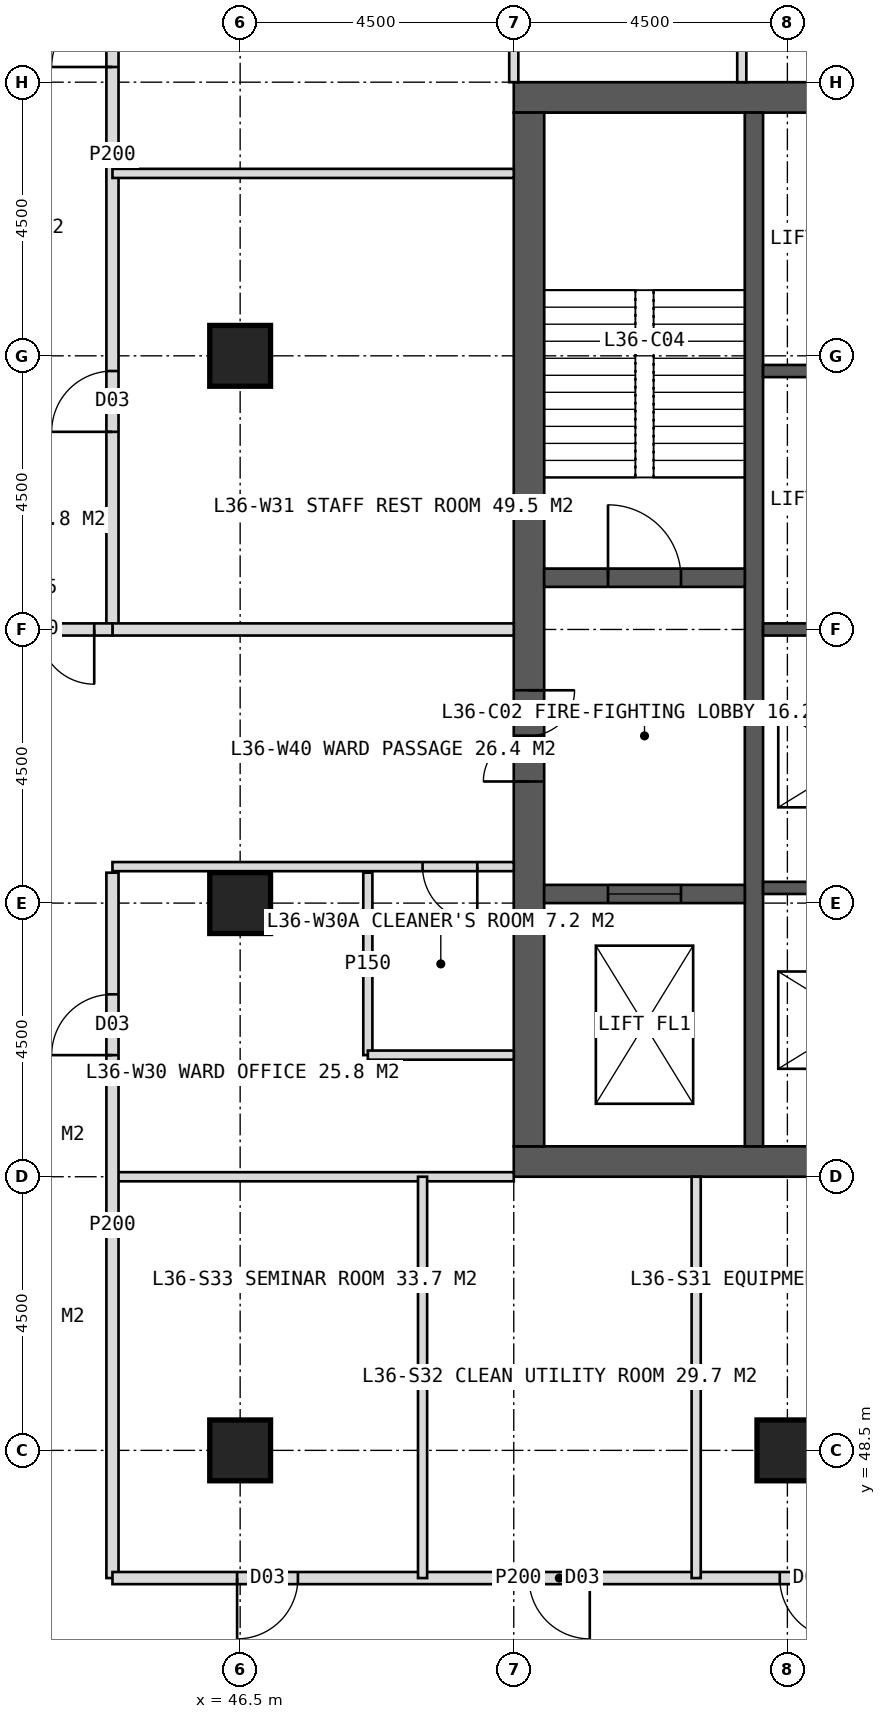
"""IFC4 building model, lengths in metres.
Left out: names, types, materials, properties, quantities, classifications, styles, units other than length and angle.
Written with IfcOpenShell. Run it as: python <this file> out.ifc"""

import sys

from ifc_helpers import new_model, si_unit, direction, frame, frame_2d, origin, origin_2d, place, context, subcontext, project, spatial, rectangle, hollow_rectangle, extrude, element, fill, save


model = new_model("IFC4")
c1 = context("Model", 3, precision=1e-05, world=origin(), true_north=direction((0.0, 1.0)))
c2 = subcontext(c1, "Body", "Model", "MODEL_VIEW")
j1 = project(units=[si_unit("LENGTHUNIT", "METRE"), si_unit("PLANEANGLEUNIT", "RADIAN")], contexts=[c1])
p1 = place(None, origin())
s1 = spatial("IfcSite", under=j1, at=p1, CompositionType="ELEMENT")
p2 = place(p1, origin())
s2 = spatial("IfcBuilding", under=s1, at=p2, CompositionType="ELEMENT")
p3 = place(p2, frame((0.0, 0.0, 152.0)))
s3 = spatial("IfcBuildingStorey", under=s2, at=p3, CompositionType="ELEMENT", Elevation=152.0)
p4 = place(p3, frame((51.0, 70.75, 0.0), z_axis=(0.0, 0.0, 1.0), x_axis=(1.0, 0.0, 0.0)))
e1 = element("IfcWall", 1, at=p4, inside=s3, PredefinedType="SHEAR", context=c2, shape_type="SweptSolid", body=[
    extrude(rectangle(XDim=18.0, YDim=0.5, at=frame_2d((9.0, 0.0))), origin(), (0.0, 0.0, 1.0), 4.0),
])
p5 = place(p4, frame((8.1, 0.0, 0.0)))
e2 = element("IfcOpeningElement", 2, at=p5, cuts=e1, PredefinedType="OPENING", context=c2, shape_type="SweptSolid", body=[
    extrude(rectangle(XDim=1.8, YDim=2.2, at=frame_2d((0.9, 1.1))), frame((0.0, 0.26, 0.0), z_axis=(0.0, -1.0, 0.0), x_axis=(1.0, 0.0, 0.0)), (0.0, 0.0, 1.0), 0.52),
])
p6 = place(p3, frame((51.0, 53.25, 0.0), z_axis=(0.0, 0.0, 1.0), x_axis=(1.0, 0.0, 0.0)))
e3 = element("IfcWall", 3, at=p6, inside=s3, PredefinedType="SHEAR", context=c2, shape_type="SweptSolid", body=[
    extrude(rectangle(XDim=18.0, YDim=0.5, at=frame_2d((9.0, 0.0))), origin(), (0.0, 0.0, 1.0), 4.0),
])
p7 = place(p6, frame((8.1, 0.0, 0.0)))
e4 = element("IfcOpeningElement", 4, at=p7, cuts=e3, PredefinedType="OPENING", context=c2, shape_type="SweptSolid", body=[
    extrude(rectangle(XDim=1.8, YDim=2.2, at=frame_2d((0.9, 1.1))), frame((0.0, 0.26, 0.0), z_axis=(0.0, -1.0, 0.0), x_axis=(1.0, 0.0, 0.0)), (0.0, 0.0, 1.0), 0.52),
])
p8 = place(p3, frame((51.25, 53.5, 0.0), z_axis=(0.0, 0.0, 1.0), x_axis=(0.0, 1.0, 0.0)))
e5 = element("IfcWall", 5, at=p8, inside=s3, PredefinedType="SHEAR", context=c2, shape_type="SweptSolid", body=[
    extrude(rectangle(XDim=17.0, YDim=0.5, at=frame_2d((8.5, 0.0))), origin(), (0.0, 0.0, 1.0), 4.0),
])
p9 = place(p8, frame((6.0, 0.0, 0.0)))
e6 = element("IfcOpeningElement", 6, at=p9, cuts=e5, PredefinedType="OPENING", context=c2, shape_type="SweptSolid", body=[
    extrude(rectangle(XDim=1.5, YDim=2.2, at=frame_2d((0.75, 1.1))), frame((0.0, 0.26, 0.0), z_axis=(0.0, -1.0, 0.0), x_axis=(1.0, 0.0, 0.0)), (0.0, 0.0, 1.0), 0.52),
])
p10 = place(p3, frame((54.95, 53.5, 0.0), z_axis=(0.0, 0.0, 1.0), x_axis=(0.0, 1.0, 0.0)))
e7 = element("IfcWall", 7, at=p10, inside=s3, PredefinedType="SHEAR", context=c2, shape_type="SweptSolid", body=[
    extrude(rectangle(XDim=17.0, YDim=0.3, at=frame_2d((8.5, 0.0))), origin(), (0.0, 0.0, 1.0), 4.0),
])
for number, where, z_axis, x_axis in (
    (8, (55.1, 57.75, 0.0), (0.0, 0.0, 1.0), (1.0, 0.0, 0.0)),
    (9, (55.1, 62.0, 0.0), (0.0, 0.0, 1.0), (1.0, 0.0, 0.0)),
    (10, (55.1, 66.25, 0.0), (0.0, 0.0, 1.0), (1.0, 0.0, 0.0)),
):
    element("IfcWall", number, at=place(p3, frame(where, z_axis=z_axis, x_axis=x_axis)), inside=s3, PredefinedType="SHEAR", context=c2, shape_type="SweptSolid", body=[
        extrude(rectangle(XDim=3.05, YDim=0.2, at=frame_2d((1.525, 0.0))), origin(), (0.0, 0.0, 1.0), 4.0),
    ])
p11 = place(p3, frame((51.5, 62.85, 0.0), z_axis=(0.0, 0.0, 1.0), x_axis=(1.0, 0.0, 0.0)))
e11 = element("IfcWall", 11, at=p11, inside=s3, PredefinedType="SHEAR", context=c2, shape_type="SweptSolid", body=[
    extrude(rectangle(XDim=3.3, YDim=0.3, at=frame_2d((1.65, 0.0))), origin(), (0.0, 0.0, 1.0), 4.0),
])
p12 = place(p11, frame((1.05, 0.0, 0.0)))
e12 = element("IfcOpeningElement", 12, at=p12, cuts=e11, PredefinedType="OPENING", context=c2, shape_type="SweptSolid", body=[
    extrude(rectangle(XDim=1.2, YDim=2.1, at=frame_2d((0.6, 1.05))), frame((0.0, 0.16, 0.0), z_axis=(0.0, -1.0, 0.0), x_axis=(1.0, 0.0, 0.0)), (0.0, 0.0, 1.0), 0.32),
])
p13 = place(p3, frame((51.5, 57.65, 0.0), z_axis=(0.0, 0.0, 1.0), x_axis=(1.0, 0.0, 0.0)))
e13 = element("IfcWall", 13, at=p13, inside=s3, PredefinedType="SHEAR", context=c2, shape_type="SweptSolid", body=[
    extrude(rectangle(XDim=3.3, YDim=0.3, at=frame_2d((1.65, 0.0))), origin(), (0.0, 0.0, 1.0), 4.0),
])
p14 = place(p13, frame((1.05, 0.0, 0.0)))
e14 = element("IfcOpeningElement", 14, at=p14, cuts=e13, PredefinedType="OPENING", context=c2, shape_type="SweptSolid", body=[
    extrude(rectangle(XDim=1.2, YDim=2.2, at=frame_2d((0.6, 1.1))), frame((0.0, 0.16, 0.0), z_axis=(0.0, -1.0, 0.0), x_axis=(1.0, 0.0, 0.0)), (0.0, 0.0, 1.0), 0.32),
])
for number, where, z_axis, x_axis in (
    (15, (46.5, 48.5, 0.0), (0.0, 0.0, 1.0), (1.0, 0.0, 0.0)),
    (16, (55.5, 48.5, 0.0), (0.0, 0.0, 1.0), (1.0, 0.0, 0.0)),
    (17, (46.5, 57.5, 0.0), (0.0, 0.0, 1.0), (1.0, 0.0, 0.0)),
    (18, (46.5, 66.5, 0.0), (0.0, 0.0, 1.0), (1.0, 0.0, 0.0)),
):
    element("IfcColumn", number, at=place(p3, frame(where, z_axis=z_axis, x_axis=x_axis)), inside=s3, PredefinedType="COLUMN", context=c2, shape_type="SweptSolid", body=[
        extrude(hollow_rectangle(XDim=1.0, YDim=1.0, WallThickness=0.1, at=origin_2d()), origin(), (0.0, 0.0, 1.0), 4.0),
    ])
p15 = place(p3, frame((51.0, 71.0, 0.0), z_axis=(0.0, 0.0, 1.0), x_axis=(0.0, 1.0, 0.0)))
e19 = element("IfcWall", 19, at=p15, inside=s3, PredefinedType="PARTITIONING", context=c2, shape_type="SweptSolid", body=[
    extrude(rectangle(XDim=6.6, YDim=0.15, at=frame_2d((3.3, 0.0))), origin(), (0.0, 0.0, 1.0), 3.75),
])
p16 = place(p3, frame((54.75, 71.0, 0.0), z_axis=(0.0, 0.0, 1.0), x_axis=(0.0, 1.0, 0.0)))
e20 = element("IfcWall", 20, at=p16, inside=s3, PredefinedType="PARTITIONING", context=c2, shape_type="SweptSolid", body=[
    extrude(rectangle(XDim=2.4, YDim=0.15, at=frame_2d((1.2, 0.0))), origin(), (0.0, 0.0, 1.0), 3.75),
])
p17 = place(p3, frame((51.0, 53.0, 0.0), z_axis=(0.0, 0.0, 1.0), x_axis=(-1.0, 0.0, 0.0)))
e21 = element("IfcWall", 21, at=p17, inside=s3, PredefinedType="PARTITIONING", context=c2, shape_type="SweptSolid", body=[
    extrude(rectangle(XDim=6.6, YDim=0.15, at=frame_2d((3.3, 0.0))), origin(), (0.0, 0.0, 1.0), 3.75),
])
p18 = place(p3, frame((44.4, 46.4, 0.0), z_axis=(0.0, 0.0, 1.0), x_axis=(0.0, 1.0, 0.0)))
e22 = element("IfcWall", 22, at=p18, inside=s3, PredefinedType="PARTITIONING", context=c2, shape_type="SweptSolid", body=[
    extrude(rectangle(XDim=11.6, YDim=0.2, at=frame_2d((5.8, 0.0))), origin(), (0.0, 0.0, 1.0), 3.75),
])
p19 = place(p18, frame((8.6, 0.0, 0.0)))
e23 = element("IfcOpeningElement", 23, at=p19, cuts=e22, PredefinedType="OPENING", context=c2, shape_type="SweptSolid", body=[
    extrude(rectangle(XDim=1.0, YDim=2.1, at=frame_2d((0.5, 1.05))), frame((0.0, 0.11, 0.0), z_axis=(0.0, -1.0, 0.0), x_axis=(1.0, 0.0, 0.0)), (0.0, 0.0, 1.0), 0.22),
])
p20 = place(p3, frame((44.4, 62.0, 0.0), z_axis=(0.0, 0.0, 1.0), x_axis=(0.0, 1.0, 0.0)))
e24 = element("IfcWall", 24, at=p20, inside=s3, PredefinedType="PARTITIONING", context=c2, shape_type="SweptSolid", body=[
    extrude(rectangle(XDim=15.6, YDim=0.2, at=frame_2d((7.8, 0.0))), origin(), (0.0, 0.0, 1.0), 3.75),
])
p21 = place(p20, frame((3.25, 0.0, 0.0)))
e25 = element("IfcOpeningElement", 25, at=p21, cuts=e24, PredefinedType="OPENING", context=c2, shape_type="SweptSolid", body=[
    extrude(rectangle(XDim=1.0, YDim=2.1, at=frame_2d((0.5, 1.05))), frame((0.0, 0.11, 0.0), z_axis=(0.0, -1.0, 0.0), x_axis=(1.0, 0.0, 0.0)), (0.0, 0.0, 1.0), 0.22),
])
p22 = place(p20, frame((9.25, 0.0, 0.0)))
e26 = element("IfcOpeningElement", 26, at=p22, cuts=e24, PredefinedType="OPENING", context=c2, shape_type="SweptSolid", body=[
    extrude(rectangle(XDim=1.0, YDim=2.1, at=frame_2d((0.5, 1.05))), frame((0.0, 0.11, 0.0), z_axis=(0.0, -1.0, 0.0), x_axis=(1.0, 0.0, 0.0)), (0.0, 0.0, 1.0), 0.22),
])
p23 = place(p20, frame((13.3, 0.0, 0.0)))
e27 = element("IfcOpeningElement", 27, at=p23, cuts=e24, PredefinedType="OPENING", context=c2, shape_type="SweptSolid", body=[
    extrude(rectangle(XDim=1.0, YDim=2.1, at=frame_2d((0.5, 1.05))), frame((0.0, 0.11, 0.0), z_axis=(0.0, -1.0, 0.0), x_axis=(1.0, 0.0, 0.0)), (0.0, 0.0, 1.0), 0.22),
])
p24 = place(p3, frame((51.0, 58.1, 0.0), z_axis=(0.0, 0.0, 1.0), x_axis=(-1.0, 0.0, 0.0)))
e28 = element("IfcWall", 28, at=p24, inside=s3, PredefinedType="PARTITIONING", context=c2, shape_type="SweptSolid", body=[
    extrude(rectangle(XDim=6.6, YDim=0.15, at=frame_2d((3.3, 0.0))), origin(), (0.0, 0.0, 1.0), 3.75),
])
p25 = place(p24, frame((0.6, 0.0, 0.0)))
e29 = element("IfcOpeningElement", 29, at=p25, cuts=e28, PredefinedType="OPENING", context=c2, shape_type="SweptSolid", body=[
    extrude(rectangle(XDim=0.9, YDim=2.1, at=frame_2d((0.45, 1.05))), frame((0.0, 0.085, 0.0), z_axis=(0.0, -1.0, 0.0), x_axis=(1.0, 0.0, 0.0)), (0.0, 0.0, 1.0), 0.17),
])
p26 = place(p3, frame((51.0, 62.0, 0.0), z_axis=(0.0, 0.0, 1.0), x_axis=(-1.0, 0.0, 0.0)))
e30 = element("IfcWall", 30, at=p26, inside=s3, PredefinedType="SOLIDWALL", context=c2, shape_type="SweptSolid", body=[
    extrude(rectangle(XDim=6.6, YDim=0.2, at=frame_2d((3.3, 0.0))), origin(), (0.0, 0.0, 1.0), 2.95),
])
p27 = place(p3, frame((51.0, 69.5, 0.0), z_axis=(0.0, 0.0, 1.0), x_axis=(-1.0, 0.0, 0.0)))
e31 = element("IfcWall", 31, at=p27, inside=s3, PredefinedType="PARTITIONING", context=c2, shape_type="SweptSolid", body=[
    extrude(rectangle(XDim=6.6, YDim=0.15, at=frame_2d((3.3, 0.0))), origin(), (0.0, 0.0, 1.0), 3.75),
])
p28 = place(p3, frame((48.6, 55.0, 0.0), z_axis=(0.0, 0.0, 1.0), x_axis=(0.0, 1.0, 0.0)))
e32 = element("IfcWall", 32, at=p28, inside=s3, PredefinedType="PARTITIONING", context=c2, shape_type="SweptSolid", body=[
    extrude(rectangle(XDim=3.0, YDim=0.15, at=frame_2d((1.5, 0.0))), origin(), (0.0, 0.0, 1.0), 3.75),
])
p29 = place(p3, frame((51.0, 55.0, 0.0), z_axis=(0.0, 0.0, 1.0), x_axis=(-1.0, 0.0, 0.0)))
e33 = element("IfcWall", 33, at=p29, inside=s3, PredefinedType="PARTITIONING", context=c2, shape_type="SweptSolid", body=[
    extrude(rectangle(XDim=2.4, YDim=0.15, at=frame_2d((1.2, 0.0))), origin(), (0.0, 0.0, 1.0), 3.75),
])
p30 = place(p3, frame((57.75, 46.4, 0.0), z_axis=(0.0, 0.0, 1.0), x_axis=(-1.0, 0.0, 0.0)))
e34 = element("IfcWall", 34, at=p30, inside=s3, PredefinedType="PARTITIONING", context=c2, shape_type="SweptSolid", body=[
    extrude(rectangle(XDim=13.35, YDim=0.2, at=frame_2d((6.675, 0.0))), origin(), (0.0, 0.0, 1.0), 3.75),
])
p31 = place(p30, frame((1.375, 0.0, 0.0)))
e35 = element("IfcOpeningElement", 35, at=p31, cuts=e34, PredefinedType="OPENING", context=c2, shape_type="SweptSolid", body=[
    extrude(rectangle(XDim=1.0, YDim=2.1, at=frame_2d((0.5, 1.05))), frame((0.0, 0.11, 0.0), z_axis=(0.0, -1.0, 0.0), x_axis=(1.0, 0.0, 0.0)), (0.0, 0.0, 1.0), 0.22),
])
p32 = place(p30, frame((5.5, 0.0, 0.0)))
e36 = element("IfcOpeningElement", 36, at=p32, cuts=e34, PredefinedType="OPENING", context=c2, shape_type="SweptSolid", body=[
    extrude(rectangle(XDim=1.0, YDim=2.1, at=frame_2d((0.5, 1.05))), frame((0.0, 0.11, 0.0), z_axis=(0.0, -1.0, 0.0), x_axis=(1.0, 0.0, 0.0)), (0.0, 0.0, 1.0), 0.22),
])
p33 = place(p30, frame((10.3, 0.0, 0.0)))
e37 = element("IfcOpeningElement", 37, at=p33, cuts=e34, PredefinedType="OPENING", context=c2, shape_type="SweptSolid", body=[
    extrude(rectangle(XDim=1.0, YDim=2.1, at=frame_2d((0.5, 1.05))), frame((0.0, 0.11, 0.0), z_axis=(0.0, -1.0, 0.0), x_axis=(1.0, 0.0, 0.0)), (0.0, 0.0, 1.0), 0.22),
])
for number, where, z_axis, x_axis in (
    (38, (54.0, 53.0, 0.0), (0.0, 0.0, 1.0), (0.0, -1.0, 0.0)),
    (39, (49.5, 53.0, 0.0), (0.0, 0.0, 1.0), (0.0, -1.0, 0.0)),
):
    element("IfcWall", number, at=place(p3, frame(where, z_axis=z_axis, x_axis=x_axis)), inside=s3, PredefinedType="PARTITIONING", context=c2, shape_type="SweptSolid", body=[
        extrude(rectangle(XDim=6.6, YDim=0.15, at=frame_2d((3.3, 0.0))), origin(), (0.0, 0.0, 1.0), 3.75),
    ])
p34 = place(p3, frame((44.4, 62.0, 0.0), z_axis=(0.0, 0.0, 1.0), x_axis=(-1.0, 0.0, 0.0)))
e40 = element("IfcWall", 40, at=p34, inside=s3, PredefinedType="SOLIDWALL", context=c2, shape_type="SweptSolid", body=[
    extrude(rectangle(XDim=2.7, YDim=0.2, at=frame_2d((1.35, 0.0))), origin(), (0.0, 0.0, 1.0), 2.95),
])
p35 = place(p34, frame((0.3, 0.0, 0.0)))
e41 = element("IfcOpeningElement", 41, at=p35, cuts=e40, PredefinedType="OPENING", context=c2, shape_type="SweptSolid", body=[
    extrude(rectangle(XDim=1.8, YDim=2.2, at=frame_2d((0.9, 1.1))), frame((0.0, 0.11, 0.0), z_axis=(0.0, -1.0, 0.0), x_axis=(1.0, 0.0, 0.0)), (0.0, 0.0, 1.0), 0.22),
])
p36 = place(p25, origin())
e42 = element("IfcDoor", 42, at=p36, inside=s3, OperationType="SINGLE_SWING_LEFT", PredefinedType="DOOR", context=c2, shape_type="SweptSolid", body=[
    extrude(rectangle(XDim=0.9, YDim=2.1, at=frame_2d((0.45, 1.05))), frame((0.0, 0.025, 0.0), z_axis=(0.0, -1.0, 0.0), x_axis=(1.0, 0.0, 0.0)), (0.0, 0.0, 1.0), 0.05),
])
fill(e29, e42)
p37 = place(p19, origin())
e43 = element("IfcDoor", 43, at=p37, inside=s3, OperationType="SINGLE_SWING_LEFT", PredefinedType="DOOR", context=c2, shape_type="SweptSolid", body=[
    extrude(rectangle(XDim=1.0, YDim=2.1, at=frame_2d((0.5, 1.05))), frame((0.0, 0.025, 0.0), z_axis=(0.0, -1.0, 0.0), x_axis=(1.0, 0.0, 0.0)), (0.0, 0.0, 1.0), 0.05),
])
fill(e23, e43)
p38 = place(p21, origin())
e44 = element("IfcDoor", 44, at=p38, inside=s3, OperationType="SINGLE_SWING_LEFT", PredefinedType="DOOR", context=c2, shape_type="SweptSolid", body=[
    extrude(rectangle(XDim=1.0, YDim=2.1, at=frame_2d((0.5, 1.05))), frame((0.0, 0.025, 0.0), z_axis=(0.0, -1.0, 0.0), x_axis=(1.0, 0.0, 0.0)), (0.0, 0.0, 1.0), 0.05),
])
fill(e25, e44)
p39 = place(p22, origin())
e45 = element("IfcDoor", 45, at=p39, inside=s3, OperationType="SINGLE_SWING_LEFT", PredefinedType="DOOR", context=c2, shape_type="SweptSolid", body=[
    extrude(rectangle(XDim=1.0, YDim=2.1, at=frame_2d((0.5, 1.05))), frame((0.0, 0.025, 0.0), z_axis=(0.0, -1.0, 0.0), x_axis=(1.0, 0.0, 0.0)), (0.0, 0.0, 1.0), 0.05),
])
fill(e26, e45)
p40 = place(p31, origin())
e46 = element("IfcDoor", 46, at=p40, inside=s3, OperationType="SINGLE_SWING_LEFT", PredefinedType="DOOR", context=c2, shape_type="SweptSolid", body=[
    extrude(rectangle(XDim=1.0, YDim=2.1, at=frame_2d((0.5, 1.05))), frame((0.0, 0.025, 0.0), z_axis=(0.0, -1.0, 0.0), x_axis=(1.0, 0.0, 0.0)), (0.0, 0.0, 1.0), 0.05),
])
fill(e35, e46)
p41 = place(p32, origin())
e47 = element("IfcDoor", 47, at=p41, inside=s3, OperationType="SINGLE_SWING_LEFT", PredefinedType="DOOR", context=c2, shape_type="SweptSolid", body=[
    extrude(rectangle(XDim=1.0, YDim=2.1, at=frame_2d((0.5, 1.05))), frame((0.0, 0.025, 0.0), z_axis=(0.0, -1.0, 0.0), x_axis=(1.0, 0.0, 0.0)), (0.0, 0.0, 1.0), 0.05),
])
fill(e36, e47)
p42 = place(p33, origin())
e48 = element("IfcDoor", 48, at=p42, inside=s3, OperationType="SINGLE_SWING_RIGHT", PredefinedType="DOOR", context=c2, shape_type="SweptSolid", body=[
    extrude(rectangle(XDim=1.0, YDim=2.1, at=frame_2d((0.5, 1.05))), frame((0.0, 0.025, 0.0), z_axis=(0.0, -1.0, 0.0), x_axis=(1.0, 0.0, 0.0)), (0.0, 0.0, 1.0), 0.05),
])
fill(e37, e48)
p43 = place(p35, origin())
e49 = element("IfcDoor", 49, at=p43, inside=s3, OperationType="DOUBLE_DOOR_DOUBLE_SWING", PredefinedType="DOOR", context=c2, shape_type="SweptSolid", body=[
    extrude(rectangle(XDim=1.8, YDim=2.2, at=frame_2d((0.9, 1.1))), frame((0.0, 0.025, 0.0), z_axis=(0.0, -1.0, 0.0), x_axis=(1.0, 0.0, 0.0)), (0.0, 0.0, 1.0), 0.05),
])
fill(e41, e49)
p44 = place(p9, origin())
e50 = element("IfcDoor", 50, at=p44, inside=s3, OperationType="DOUBLE_DOOR_SINGLE_SWING", PredefinedType="DOOR", context=c2, shape_type="SweptSolid", body=[
    extrude(rectangle(XDim=1.5, YDim=2.2, at=frame_2d((0.75, 1.1))), frame((0.0, 0.025, 0.0), z_axis=(0.0, -1.0, 0.0), x_axis=(1.0, 0.0, 0.0)), (0.0, 0.0, 1.0), 0.05),
])
fill(e6, e50)
p45 = place(p12, origin())
e51 = element("IfcDoor", 51, at=p45, inside=s3, OperationType="SINGLE_SWING_LEFT", PredefinedType="DOOR", context=c2, shape_type="SweptSolid", body=[
    extrude(rectangle(XDim=1.2, YDim=2.1, at=frame_2d((0.6, 1.05))), frame((0.0, 0.025, 0.0), z_axis=(0.0, -1.0, 0.0), x_axis=(1.0, 0.0, 0.0)), (0.0, 0.0, 1.0), 0.05),
])
fill(e12, e51)
p46 = place(p14, origin())
e52 = element("IfcDoor", 52, at=p46, inside=s3, OperationType="SLIDING_TO_LEFT", PredefinedType="DOOR", context=c2, shape_type="SweptSolid", body=[
    extrude(rectangle(XDim=1.2, YDim=2.2, at=frame_2d((0.6, 1.1))), frame((0.0, 0.025, 0.0), z_axis=(0.0, -1.0, 0.0), x_axis=(1.0, 0.0, 0.0)), (0.0, 0.0, 1.0), 0.05),
])
fill(e14, e52)
save(model, sys.argv[1])
